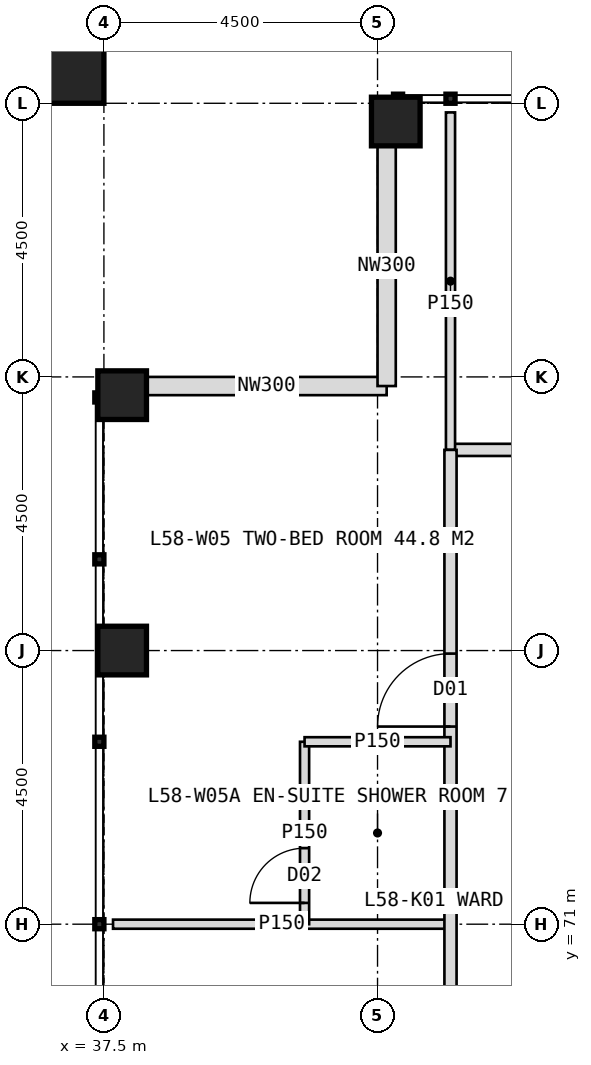
"""IFC4 building model, lengths in metres.
Left out: names, types, materials, properties, quantities, classifications, styles, units other than length and angle.
Written with IfcOpenShell. Run it as: python <this file> out.ifc"""

import sys

from ifc_helpers import new_model, si_unit, direction, frame, frame_2d, origin, origin_2d, place, context, subcontext, project, spatial, rectangle, hollow_rectangle, extrude, element, fill, save


model = new_model("IFC4")
c1 = context("Model", 3, precision=1e-05, world=origin(), true_north=direction((0.0, 1.0)))
c2 = subcontext(c1, "Body", "Model", "MODEL_VIEW")
j1 = project(units=[si_unit("LENGTHUNIT", "METRE"), si_unit("PLANEANGLEUNIT", "RADIAN")], contexts=[c1])
p1 = place(None, origin())
s1 = spatial("IfcSite", under=j1, at=p1, CompositionType="ELEMENT")
p2 = place(p1, origin())
s2 = spatial("IfcBuilding", under=s1, at=p2, CompositionType="ELEMENT")
p3 = place(p2, frame((0.0, 0.0, 241.0)))
s3 = spatial("IfcBuildingStorey", under=s2, at=p3, CompositionType="ELEMENT", Elevation=241.0)
for number, where, z_axis, x_axis in (
    (1, (42.3, 84.2, 0.0), (0.0, 0.0, 1.0), (1.0, 0.0, 0.0)),
    (2, (37.8, 75.5, 0.0), (0.0, 0.0, 1.0), (1.0, 0.0, 0.0)),
    (3, (37.8, 79.7, 0.0), (0.0, 0.0, 1.0), (1.0, 0.0, 0.0)),
):
    element("IfcColumn", number, at=place(p3, frame(where, z_axis=z_axis, x_axis=x_axis)), inside=s3, PredefinedType="COLUMN", context=c2, shape_type="SweptSolid", body=[
        extrude(hollow_rectangle(XDim=0.8, YDim=0.8, WallThickness=0.08, at=origin_2d()), origin(), (0.0, 0.0, 1.0), 4.0),
    ])
p4 = place(p3, frame((36.9, 85.1, 0.0), z_axis=(0.0, 0.0, 1.0), x_axis=(1.0, 0.0, 0.0)))
e4 = element("IfcColumn", 4, at=p4, inside=s3, PredefinedType="COLUMN", context=c2, shape_type="SweptSolid", body=[
    extrude(hollow_rectangle(XDim=1.2, YDim=1.2, WallThickness=0.07, at=origin_2d()), origin(), (0.0, 0.0, 1.0), 2.0),
])
for number, where, z_axis, x_axis in (
    (5, (38.2, 79.85, 0.0), (0.0, 0.0, 1.0), (1.0, 0.0, 0.0)),
    (6, (42.15, 79.85, 0.0), (0.0, 0.0, 1.0), (0.0, 1.0, 0.0)),
):
    element("IfcWall", number, at=place(p3, frame(where, z_axis=z_axis, x_axis=x_axis)), inside=s3, PredefinedType="ELEMENTEDWALL", context=c2, shape_type="SweptSolid", body=[
        extrude(rectangle(XDim=3.95, YDim=0.3, at=frame_2d((1.975, 0.0))), origin(), (0.0, 0.0, 1.0), 2.95),
    ])
p5 = place(p3, frame((43.2, 78.8, 0.0), z_axis=(0.0, 0.0, 1.0), x_axis=(1.0, 0.0, 0.0)))
e7 = element("IfcWall", 7, at=p5, inside=s3, PredefinedType="PARTITIONING", context=c2, shape_type="SweptSolid", body=[
    extrude(rectangle(XDim=33.6, YDim=0.2, at=frame_2d((16.8, 0.0))), origin(), (0.0, 0.0, 1.0), 3.75),
])
p6 = place(p5, frame((3.4, 0.0, 0.0)))
e8 = element("IfcOpeningElement", 8, at=p6, cuts=e7, PredefinedType="OPENING", context=c2, shape_type="SweptSolid", body=[
    extrude(rectangle(XDim=1.0, YDim=2.1, at=frame_2d((0.5, 1.05))), frame((0.0, 0.11, 0.0), z_axis=(0.0, -1.0, 0.0), x_axis=(1.0, 0.0, 0.0)), (0.0, 0.0, 1.0), 0.22),
])
p7 = place(p5, frame((11.05, 0.0, 0.0)))
e9 = element("IfcOpeningElement", 9, at=p7, cuts=e7, PredefinedType="OPENING", context=c2, shape_type="SweptSolid", body=[
    extrude(rectangle(XDim=1.2, YDim=2.2, at=frame_2d((0.6, 1.1))), frame((0.0, 0.11, 0.0), z_axis=(0.0, -1.0, 0.0), x_axis=(1.0, 0.0, 0.0)), (0.0, 0.0, 1.0), 0.22),
])
p8 = place(p5, frame((20.05, 0.0, 0.0)))
e10 = element("IfcOpeningElement", 10, at=p8, cuts=e7, PredefinedType="OPENING", context=c2, shape_type="SweptSolid", body=[
    extrude(rectangle(XDim=1.2, YDim=2.2, at=frame_2d((0.6, 1.1))), frame((0.0, 0.11, 0.0), z_axis=(0.0, -1.0, 0.0), x_axis=(1.0, 0.0, 0.0)), (0.0, 0.0, 1.0), 0.22),
])
p9 = place(p5, frame((29.05, 0.0, 0.0)))
e11 = element("IfcOpeningElement", 11, at=p9, cuts=e7, PredefinedType="OPENING", context=c2, shape_type="SweptSolid", body=[
    extrude(rectangle(XDim=1.2, YDim=2.2, at=frame_2d((0.6, 1.1))), frame((0.0, 0.11, 0.0), z_axis=(0.0, -1.0, 0.0), x_axis=(1.0, 0.0, 0.0)), (0.0, 0.0, 1.0), 0.22),
])
for number, where, z_axis, x_axis in (
    (12, (43.2, 78.8, 0.0), (0.0, 0.0, 1.0), (0.0, 1.0, 0.0)),
    (13, (43.2, 71.0, 0.0), (0.0, 0.0, 1.0), (-1.0, 0.0, 0.0)),
):
    element("IfcWall", number, at=place(p3, frame(where, z_axis=z_axis, x_axis=x_axis)), inside=s3, PredefinedType="PARTITIONING", context=c2, shape_type="SweptSolid", body=[
        extrude(rectangle(XDim=5.55, YDim=0.15, at=frame_2d((2.775, 0.0))), origin(), (0.0, 0.0, 1.0), 3.75),
    ])
p10 = place(p3, frame((43.2, 45.2, 0.0), z_axis=(0.0, 0.0, 1.0), x_axis=(0.0, 1.0, 0.0)))
e14 = element("IfcWall", 14, at=p10, inside=s3, PredefinedType="PARTITIONING", context=c2, shape_type="SweptSolid", body=[
    extrude(rectangle(XDim=33.6, YDim=0.2, at=frame_2d((16.8, 0.0))), origin(), (0.0, 0.0, 1.0), 3.75),
])
p11 = place(p10, frame((2.65, 0.0, 0.0)))
e15 = element("IfcOpeningElement", 15, at=p11, cuts=e14, PredefinedType="OPENING", context=c2, shape_type="SweptSolid", body=[
    extrude(rectangle(XDim=1.2, YDim=2.2, at=frame_2d((0.6, 1.1))), frame((0.0, 0.11, 0.0), z_axis=(0.0, -1.0, 0.0), x_axis=(1.0, 0.0, 0.0)), (0.0, 0.0, 1.0), 0.22),
])
p12 = place(p10, frame((7.45, 0.0, 0.0)))
e16 = element("IfcOpeningElement", 16, at=p12, cuts=e14, PredefinedType="OPENING", context=c2, shape_type="SweptSolid", body=[
    extrude(rectangle(XDim=1.2, YDim=2.2, at=frame_2d((0.6, 1.1))), frame((0.0, 0.11, 0.0), z_axis=(0.0, -1.0, 0.0), x_axis=(1.0, 0.0, 0.0)), (0.0, 0.0, 1.0), 0.22),
])
p13 = place(p10, frame((13.45, 0.0, 0.0)))
e17 = element("IfcOpeningElement", 17, at=p13, cuts=e14, PredefinedType="OPENING", context=c2, shape_type="SweptSolid", body=[
    extrude(rectangle(XDim=1.2, YDim=2.2, at=frame_2d((0.6, 1.1))), frame((0.0, 0.11, 0.0), z_axis=(0.0, -1.0, 0.0), x_axis=(1.0, 0.0, 0.0)), (0.0, 0.0, 1.0), 0.22),
])
p14 = place(p10, frame((20.05, 0.0, 0.0)))
e18 = element("IfcOpeningElement", 18, at=p14, cuts=e14, PredefinedType="OPENING", context=c2, shape_type="SweptSolid", body=[
    extrude(rectangle(XDim=1.2, YDim=2.2, at=frame_2d((0.6, 1.1))), frame((0.0, 0.11, 0.0), z_axis=(0.0, -1.0, 0.0), x_axis=(1.0, 0.0, 0.0)), (0.0, 0.0, 1.0), 0.22),
])
p15 = place(p10, frame((29.05, 0.0, 0.0)))
e19 = element("IfcOpeningElement", 19, at=p15, cuts=e14, PredefinedType="OPENING", context=c2, shape_type="SweptSolid", body=[
    extrude(rectangle(XDim=1.2, YDim=2.2, at=frame_2d((0.6, 1.1))), frame((0.0, 0.11, 0.0), z_axis=(0.0, -1.0, 0.0), x_axis=(1.0, 0.0, 0.0)), (0.0, 0.0, 1.0), 0.22),
])
p16 = place(p3, frame((40.8, 71.0, 0.0), z_axis=(0.0, 0.0, 1.0), x_axis=(0.0, 1.0, 0.0)))
e20 = element("IfcWall", 20, at=p16, inside=s3, PredefinedType="PARTITIONING", context=c2, shape_type="SweptSolid", body=[
    extrude(rectangle(XDim=3.0, YDim=0.15, at=frame_2d((1.5, 0.0))), origin(), (0.0, 0.0, 1.0), 3.75),
])
p17 = place(p16, frame((0.35, 0.0, 0.0)))
e21 = element("IfcOpeningElement", 21, at=p17, cuts=e20, PredefinedType="OPENING", context=c2, shape_type="SweptSolid", body=[
    extrude(rectangle(XDim=0.9, YDim=2.1, at=frame_2d((0.45, 1.05))), frame((0.0, 0.085, 0.0), z_axis=(0.0, -1.0, 0.0), x_axis=(1.0, 0.0, 0.0)), (0.0, 0.0, 1.0), 0.17),
])
p18 = place(p3, frame((43.2, 74.0, 0.0), z_axis=(0.0, 0.0, 1.0), x_axis=(-1.0, 0.0, 0.0)))
e22 = element("IfcWall", 22, at=p18, inside=s3, PredefinedType="PARTITIONING", context=c2, shape_type="SweptSolid", body=[
    extrude(rectangle(XDim=2.4, YDim=0.15, at=frame_2d((1.2, 0.0))), origin(), (0.0, 0.0, 1.0), 3.75),
])
p19 = place(p15, origin())
e23 = element("IfcDoor", 23, at=p19, inside=s3, OperationType="SINGLE_SWING_LEFT", PredefinedType="DOOR", context=c2, shape_type="SweptSolid", body=[
    extrude(rectangle(XDim=1.2, YDim=2.2, at=frame_2d((0.6, 1.1))), frame((0.0, 0.025, 0.0), z_axis=(0.0, -1.0, 0.0), x_axis=(1.0, 0.0, 0.0)), (0.0, 0.0, 1.0), 0.05),
])
fill(e19, e23)
p20 = place(p17, origin())
e24 = element("IfcDoor", 24, at=p20, inside=s3, OperationType="SINGLE_SWING_LEFT", PredefinedType="DOOR", context=c2, shape_type="SweptSolid", body=[
    extrude(rectangle(XDim=0.9, YDim=2.1, at=frame_2d((0.45, 1.05))), frame((0.0, 0.025, 0.0), z_axis=(0.0, -1.0, 0.0), x_axis=(1.0, 0.0, 0.0)), (0.0, 0.0, 1.0), 0.05),
])
fill(e21, e24)
save(model, sys.argv[1])
